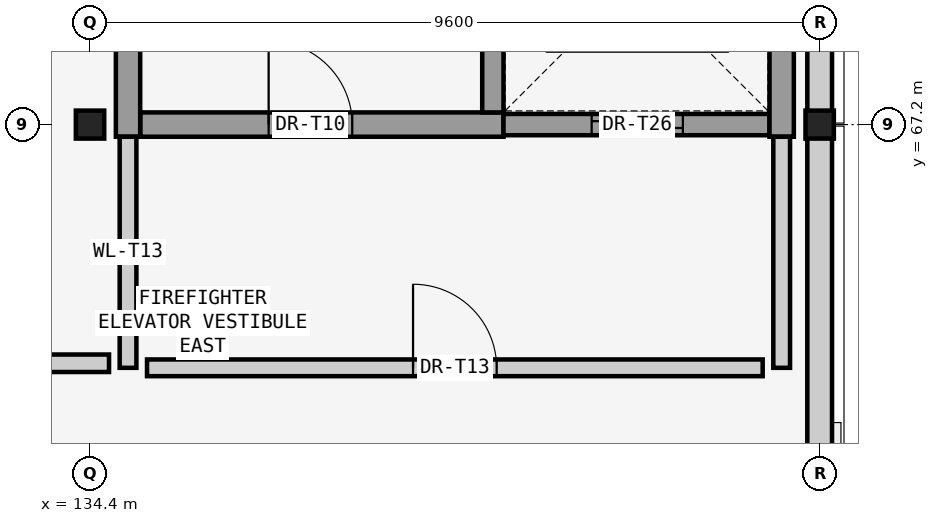
"""IFC4 building model, lengths in metres.
Left out: names, types, materials, properties, quantities, classifications, styles, units other than length and angle.
Written with IfcOpenShell. Run it as: python <this file> out.ifc"""

import sys

from ifc_helpers import new_model, si_unit, direction, frame, frame_2d, origin, origin_2d, place, context, subcontext, project, spatial, rectangle, i_section, extrude, element, fill, save


model = new_model("IFC4")
c1 = context("Model", 3, precision=1e-05, world=origin(), true_north=direction((0.0, 1.0)))
c2 = subcontext(c1, "Body", "Model", "MODEL_VIEW")
j1 = project(units=[si_unit("LENGTHUNIT", "METRE"), si_unit("PLANEANGLEUNIT", "RADIAN")], contexts=[c1])
p1 = place(None, origin())
s1 = spatial("IfcSite", under=j1, at=p1, CompositionType="ELEMENT")
p2 = place(p1, origin())
s2 = spatial("IfcBuilding", under=s1, at=p2, CompositionType="ELEMENT")
p3 = place(p2, frame((0.0, 0.0, 19.8)))
s3 = spatial("IfcBuildingStorey", under=s2, at=p3, CompositionType="ELEMENT", Elevation=19.8)
p4 = place(p3, frame((134.4, 67.2, 0.0), z_axis=(0.0, 0.0, 1.0), x_axis=(1.0, 0.0, 0.0)))
e1 = element("IfcColumn", 1, at=p4, inside=s3, PredefinedType="COLUMN", context=c2, shape_type="SweptSolid", body=[
    extrude(i_section(OverallWidth=0.373, OverallDepth=0.368, WebThickness=0.018, FlangeThickness=0.028, at=origin_2d()), origin(), (0.0, 0.0, 1.0), 4.53),
])
p5 = place(p3, frame((144.0, 67.2, 0.0), z_axis=(0.0, 0.0, 1.0), x_axis=(1.0, 0.0, 0.0)))
e2 = element("IfcColumn", 2, at=p5, inside=s3, PredefinedType="COLUMN", context=c2, shape_type="SweptSolid", body=[
    extrude(i_section(OverallWidth=0.373, OverallDepth=0.368, WebThickness=0.018, FlangeThickness=0.028, at=origin_2d()), origin(), (0.0, 0.0, 1.0), 4.6),
])
p6 = place(p3, frame((144.0, 67.18, 0.0), z_axis=(0.0, 0.0, 1.0), x_axis=(0.0, -1.0, 0.0)))
e3 = element("IfcWall", 3, at=p6, inside=s3, PredefinedType="SOLIDWALL", context=c2, shape_type="SweptSolid", body=[
    extrude(rectangle(XDim=8.36, YDim=0.325, at=frame_2d((4.18, 0.0))), origin(), (0.0, 0.0, 1.0), 4.248),
])
p7 = place(p3, frame((144.0, 75.58, 0.0), z_axis=(0.0, 0.0, 1.0), x_axis=(0.0, -1.0, 0.0)))
e4 = element("IfcWall", 4, at=p7, inside=s3, PredefinedType="SOLIDWALL", context=c2, shape_type="SweptSolid", body=[
    extrude(rectangle(XDim=8.36, YDim=0.325, at=frame_2d((4.18, 0.0))), origin(), (0.0, 0.0, 1.0), 4.248),
])
p8 = place(p3, frame((135.06, 67.2, 0.0), z_axis=(0.0, 0.0, 1.0), x_axis=(1.0, 0.0, 0.0)))
e5 = element("IfcWall", 5, at=p8, inside=s3, PredefinedType="SHEAR", context=c2, shape_type="SweptSolid", body=[
    extrude(rectangle(XDim=4.78, YDim=0.32, at=frame_2d((2.39, 0.0))), origin(), (0.0, 0.0, 1.0), 4.58),
])
p9 = place(p8, frame((1.69, 0.0, 0.0)))
e6 = element("IfcOpeningElement", 6, at=p9, cuts=e5, PredefinedType="OPENING", context=c2, shape_type="SweptSolid", body=[
    extrude(rectangle(XDim=1.1, YDim=2.2, at=frame_2d((0.55, 1.1))), frame((0.0, 0.17, 0.0), z_axis=(0.0, -1.0, 0.0), x_axis=(1.0, 0.0, 0.0)), (0.0, 0.0, 1.0), 0.34),
])
p10 = place(p3, frame((139.84, 67.2, 0.0), z_axis=(0.0, 0.0, 1.0), x_axis=(1.0, 0.0, 0.0)))
e7 = element("IfcWall", 7, at=p10, inside=s3, PredefinedType="SHEAR", context=c2, shape_type="SweptSolid", body=[
    extrude(rectangle(XDim=3.5, YDim=0.28, at=frame_2d((1.75, 0.0))), origin(), (0.0, 0.0, 1.0), 4.58),
])
p11 = place(p10, frame((1.16, 0.0, 0.0)))
e8 = element("IfcOpeningElement", 8, at=p11, cuts=e7, PredefinedType="OPENING", context=c2, shape_type="SweptSolid", body=[
    extrude(rectangle(XDim=1.2, YDim=2.2, at=frame_2d((0.6, 1.1))), frame((0.0, 0.15, 0.0), z_axis=(0.0, -1.0, 0.0), x_axis=(1.0, 0.0, 0.0)), (0.0, 0.0, 1.0), 0.3),
])
for number, where, z_axis, x_axis in (
    (9, (134.9, 75.4, 0.0), (0.0, 0.0, 1.0), (0.0, -1.0, 0.0)),
    (10, (143.5, 67.04, 0.0), (0.0, 0.0, 1.0), (0.0, 1.0, 0.0)),
):
    element("IfcWall", number, at=place(p3, frame(where, z_axis=z_axis, x_axis=x_axis)), inside=s3, PredefinedType="SHEAR", context=c2, shape_type="SweptSolid", body=[
        extrude(rectangle(XDim=8.36, YDim=0.32, at=frame_2d((4.18, 0.0))), origin(), (0.0, 0.0, 1.0), 4.58),
    ])
p12 = place(p3, frame((139.7, 67.36, 0.0), z_axis=(0.0, 0.0, 1.0), x_axis=(0.0, 1.0, 0.0)))
e11 = element("IfcWall", 11, at=p12, inside=s3, PredefinedType="SHEAR", context=c2, shape_type="SweptSolid", body=[
    extrude(rectangle(XDim=7.72, YDim=0.28, at=frame_2d((3.86, 0.0))), origin(), (0.0, 0.0, 1.0), 4.58),
])
for number, where, z_axis, x_axis in (
    (12, (134.9, 64.0, 0.0), (0.0, 0.0, 1.0), (0.0, 1.0, 0.0)),
    (13, (143.5, 64.0, 0.0), (0.0, 0.0, 1.0), (0.0, 1.0, 0.0)),
):
    element("IfcWall", number, at=place(p3, frame(where, z_axis=z_axis, x_axis=x_axis)), inside=s3, PredefinedType="SOLIDWALL", context=c2, shape_type="SweptSolid", body=[
        extrude(rectangle(XDim=3.04, YDim=0.22, at=frame_2d((1.52, 0.0))), origin(), (0.0, 0.0, 1.0), 4.32),
    ])
p13 = place(p3, frame((135.15, 64.0, 0.0), z_axis=(0.0, 0.0, 1.0), x_axis=(1.0, 0.0, 0.0)))
e14 = element("IfcWall", 14, at=p13, inside=s3, PredefinedType="SOLIDWALL", context=c2, shape_type="SweptSolid", body=[
    extrude(rectangle(XDim=8.1, YDim=0.22, at=frame_2d((4.05, 0.0))), origin(), (0.0, 0.0, 1.0), 4.32),
])
p14 = place(p13, frame((3.5, 0.0, 0.0)))
e15 = element("IfcOpeningElement", 15, at=p14, cuts=e14, PredefinedType="OPENING", context=c2, shape_type="SweptSolid", body=[
    extrude(rectangle(XDim=1.1, YDim=2.2, at=frame_2d((0.55, 1.1))), frame((0.0, 0.12, 0.0), z_axis=(0.0, -1.0, 0.0), x_axis=(1.0, 0.0, 0.0)), (0.0, 0.0, 1.0), 0.24),
])
p15 = place(p3, frame((109.71, 64.06, 0.0), z_axis=(0.0, 0.0, 1.0), x_axis=(1.0, 0.0, 0.0)))
e16 = element("IfcWall", 16, at=p15, inside=s3, PredefinedType="SOLIDWALL", context=c2, shape_type="SweptSolid", body=[
    extrude(rectangle(XDim=24.94, YDim=0.23, at=frame_2d((12.47, 0.0))), origin(), (0.0, 0.0, 1.0), 4.48),
])
p16 = place(p15, frame((11.57, 0.0, 0.0)))
e17 = element("IfcOpeningElement", 17, at=p16, cuts=e16, PredefinedType="OPENING", context=c2, shape_type="SweptSolid", body=[
    extrude(rectangle(XDim=1.8, YDim=2.4, at=frame_2d((0.9, 1.2))), frame((0.0, 0.125, 0.0), z_axis=(0.0, -1.0, 0.0), x_axis=(1.0, 0.0, 0.0)), (0.0, 0.0, 1.0), 0.25),
])
p17 = place(p9, origin())
e18 = element("IfcDoor", 18, at=p17, inside=s3, OperationType="SINGLE_SWING_LEFT", PredefinedType="DOOR", context=c2, shape_type="SweptSolid", body=[
    extrude(rectangle(XDim=1.1, YDim=2.2, at=frame_2d((0.55, 1.1))), frame((0.0, 0.025, 0.0), z_axis=(0.0, -1.0, 0.0), x_axis=(1.0, 0.0, 0.0)), (0.0, 0.0, 1.0), 0.05),
])
fill(e6, e18)
p18 = place(p11, origin())
e19 = element("IfcDoor", 19, at=p18, inside=s3, OperationType="SLIDING_TO_RIGHT", PredefinedType="DOOR", context=c2, shape_type="SweptSolid", body=[
    extrude(rectangle(XDim=1.2, YDim=2.2, at=frame_2d((0.6, 1.1))), frame((0.0, 0.025, 0.0), z_axis=(0.0, -1.0, 0.0), x_axis=(1.0, 0.0, 0.0)), (0.0, 0.0, 1.0), 0.05),
])
fill(e8, e19)
p19 = place(p14, origin())
e20 = element("IfcDoor", 20, at=p19, inside=s3, OperationType="SINGLE_SWING_LEFT", PredefinedType="DOOR", context=c2, shape_type="SweptSolid", body=[
    extrude(rectangle(XDim=1.1, YDim=2.2, at=frame_2d((0.55, 1.1))), frame((0.0, 0.025, 0.0), z_axis=(0.0, -1.0, 0.0), x_axis=(1.0, 0.0, 0.0)), (0.0, 0.0, 1.0), 0.05),
])
fill(e15, e20)
save(model, sys.argv[1])
